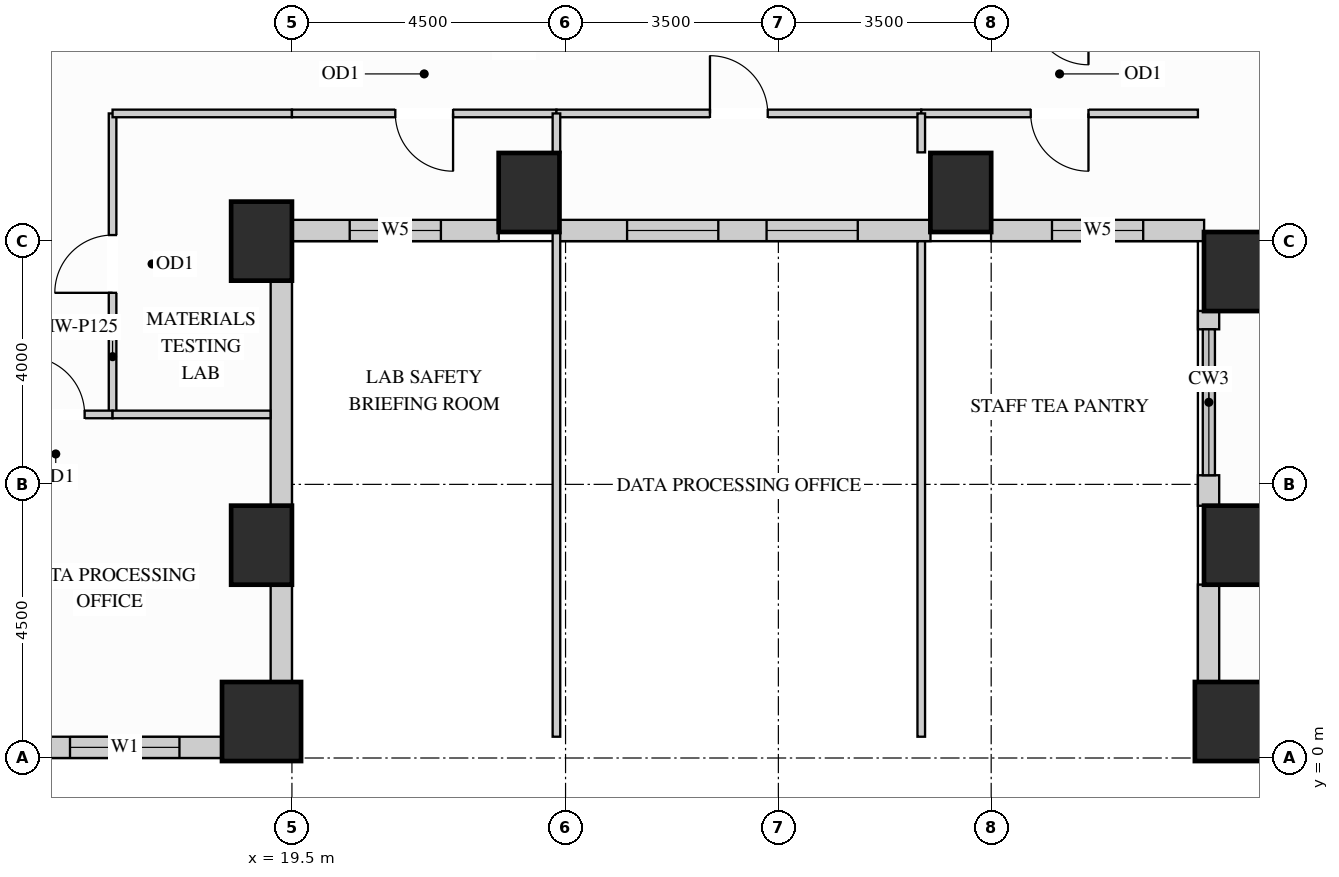
"""IFC4 building model, lengths in metres.
Left out: names, types, materials, properties, quantities, classifications, styles, units other than length and angle.
Written with IfcOpenShell. Run it as: python <this file> out.ifc"""

import sys

from ifc_helpers import new_model, si_unit, direction, frame, frame_2d, origin, origin_2d, place, context, subcontext, project, spatial, rectangle, extrude, source, transform, mapped, element, fill, save


model = new_model("IFC4")
c1 = context("Model", 3, precision=1e-05, world=origin(), true_north=direction((0.0, 1.0)))
c2 = subcontext(c1, "Body", "Model", "MODEL_VIEW")
j1 = project(units=[si_unit("LENGTHUNIT", "METRE"), si_unit("PLANEANGLEUNIT", "RADIAN")], contexts=[c1])
p1 = place(None, origin())
s1 = spatial("IfcSite", under=j1, at=p1, CompositionType="ELEMENT")
p2 = place(p1, origin())
s2 = spatial("IfcBuilding", under=s1, at=p2, CompositionType="ELEMENT")
p3 = place(p2, frame((0.0, 0.0, 58.5)))
s3 = spatial("IfcBuildingStorey", under=s2, at=p3, CompositionType="ELEMENT", Elevation=58.5)
m1 = source(origin(), c2, "Body", "SweptSolid", [
    extrude(rectangle(XDim=1.0, YDim=1.3, at=origin_2d()), origin(), (0.0, 0.0, 1.0), 3.38),
])
for number, where, z_axis, x_axis in (
    (1, (19.0, 3.5, 0.0), (0.0, 0.0, 1.0), (1.0, 0.0, 0.0)),
    (2, (19.0, 8.5, 0.0), (0.0, 0.0, 1.0), (1.0, 0.0, 0.0)),
    (3, (35.0, 3.5, 0.0), (0.0, 0.0, 1.0), (1.0, 0.0, 0.0)),
    (4, (35.0, 8.0, 0.0), (0.0, 0.0, 1.0), (1.0, 0.0, 0.0)),
    (5, (23.4, 9.3, 0.0), (0.0, 0.0, 1.0), (1.0, 0.0, 0.0)),
    (6, (30.5, 9.3, 0.0), (0.0, 0.0, 1.0), (1.0, 0.0, 0.0)),
):
    element("IfcColumn", number, at=place(p3, frame(where, z_axis=z_axis, x_axis=x_axis)), inside=s3, PredefinedType="COLUMN", context=c2, shape_type="MappedRepresentation", body=[
        mapped(m1, transform((0.0, 0.0, 0.0), x_axis=(1.0, 0.0, 0.0), y_axis=(0.0, 1.0, 0.0), z_axis=(0.0, 0.0, 1.0))),
    ])
m2 = source(origin(), c2, "Body", "SweptSolid", [
    extrude(rectangle(XDim=1.3, YDim=1.3, at=origin_2d()), origin(), (0.0, 0.0, 1.0), 3.38),
])
for number, where, z_axis, x_axis in (
    (7, (19.0, 0.6, 0.0), (0.0, 0.0, 1.0), (1.0, 0.0, 0.0)),
    (8, (35.0, 0.6, 0.0), (0.0, 0.0, 1.0), (1.0, 0.0, 0.0)),
):
    element("IfcColumn", number, at=place(p3, frame(where, z_axis=z_axis, x_axis=x_axis)), inside=s3, PredefinedType="COLUMN", context=c2, shape_type="MappedRepresentation", body=[
        mapped(m2, transform((0.0, 0.0, 0.0), x_axis=(1.0, 0.0, 0.0), y_axis=(0.0, 1.0, 0.0), z_axis=(0.0, 0.0, 1.0))),
    ])
p4 = place(p3, frame((15.148, 0.175, 0.0), z_axis=(0.0, 0.0, 1.0), x_axis=(1.0, 0.0, 0.0)))
e9 = element("IfcWall", 9, at=p4, inside=s3, PredefinedType="SOLIDWALL", context=c2, shape_type="SweptSolid", body=[
    extrude(rectangle(XDim=3.204, YDim=0.35, at=frame_2d((1.602, 0.0))), origin(), (0.0, 0.0, 1.0), 2.51),
])
p5 = place(p4, frame((0.702, 0.0, 0.78)))
e10 = element("IfcOpeningElement", 10, at=p5, cuts=e9, PredefinedType="OPENING", context=c2, shape_type="SweptSolid", body=[
    extrude(rectangle(XDim=1.8, YDim=1.55, at=frame_2d((0.9, 0.775))), frame((0.0, 0.185, 0.0), z_axis=(0.0, -1.0, 0.0), x_axis=(1.0, 0.0, 0.0)), (0.0, 0.0, 1.0), 0.37),
])
m3 = source(origin(), c2, "Body", "SweptSolid", [
    extrude(rectangle(XDim=1.604, YDim=0.35, at=frame_2d((0.802, 0.0))), origin(), (0.0, 0.0, 1.0), 2.51),
])
p6 = place(p3, frame((19.325, 1.248, 0.0), z_axis=(0.0, 0.0, 1.0), x_axis=(0.0, 1.0, 0.0)))
e11 = element("IfcWall", 11, at=p6, inside=s3, PredefinedType="SOLIDWALL", context=c2, shape_type="MappedRepresentation", body=[
    mapped(m3, transform((0.0, 0.0, 0.0), x_axis=(1.0, 0.0, 0.0), y_axis=(0.0, 1.0, 0.0), z_axis=(0.0, 0.0, 1.0))),
])
m4 = source(origin(), c2, "Body", "SweptSolid", [
    extrude(rectangle(XDim=3.704, YDim=0.35, at=frame_2d((1.852, 0.0))), origin(), (0.0, 0.0, 1.0), 2.51),
])
p7 = place(p3, frame((19.325, 4.148, 0.0), z_axis=(0.0, 0.0, 1.0), x_axis=(0.0, 1.0, 0.0)))
e12 = element("IfcWall", 12, at=p7, inside=s3, PredefinedType="SOLIDWALL", context=c2, shape_type="MappedRepresentation", body=[
    mapped(m4, transform((0.0, 0.0, 0.0), x_axis=(1.0, 0.0, 0.0), y_axis=(0.0, 1.0, 0.0), z_axis=(0.0, 0.0, 1.0))),
])
p8 = place(p3, frame((19.498, 8.675, 0.0), z_axis=(0.0, 0.0, 1.0), x_axis=(1.0, 0.0, 0.0)))
e13 = element("IfcWall", 13, at=p8, inside=s3, PredefinedType="SOLIDWALL", context=c2, shape_type="SweptSolid", body=[
    extrude(rectangle(XDim=3.404, YDim=0.35, at=frame_2d((1.702, 0.0))), origin(), (0.0, 0.0, 1.0), 3.365),
])
p9 = place(p8, frame((0.952, 0.0, 0.78)))
e14 = element("IfcOpeningElement", 14, at=p9, cuts=e13, PredefinedType="OPENING", context=c2, shape_type="SweptSolid", body=[
    extrude(rectangle(XDim=1.5, YDim=2.0, at=frame_2d((0.75, 1.0))), frame((0.0, 0.185, 0.0), z_axis=(0.0, -1.0, 0.0), x_axis=(1.0, 0.0, 0.0)), (0.0, 0.0, 1.0), 0.37),
])
p10 = place(p3, frame((23.898, 8.675, 0.0), z_axis=(0.0, 0.0, 1.0), x_axis=(1.0, 0.0, 0.0)))
e15 = element("IfcWall", 15, at=p10, inside=s3, PredefinedType="SOLIDWALL", context=c2, shape_type="SweptSolid", body=[
    extrude(rectangle(XDim=6.104, YDim=0.35, at=frame_2d((3.052, 0.0))), origin(), (0.0, 0.0, 1.0), 3.365),
])
p11 = place(p10, frame((1.114, 0.0, 0.78)))
e16 = element("IfcOpeningElement", 16, at=p11, cuts=e15, PredefinedType="OPENING", context=c2, shape_type="SweptSolid", body=[
    extrude(rectangle(XDim=1.5, YDim=2.0, at=frame_2d((0.75, 1.0))), frame((0.0, 0.185, 0.0), z_axis=(0.0, -1.0, 0.0), x_axis=(1.0, 0.0, 0.0)), (0.0, 0.0, 1.0), 0.37),
])
p12 = place(p10, frame((3.408, 0.0, 0.78)))
e17 = element("IfcOpeningElement", 17, at=p12, cuts=e15, PredefinedType="OPENING", context=c2, shape_type="SweptSolid", body=[
    extrude(rectangle(XDim=1.5, YDim=2.0, at=frame_2d((0.75, 1.0))), frame((0.0, 0.185, 0.0), z_axis=(0.0, -1.0, 0.0), x_axis=(1.0, 0.0, 0.0)), (0.0, 0.0, 1.0), 0.37),
])
p13 = place(p3, frame((30.998, 8.675, 0.0), z_axis=(0.0, 0.0, 1.0), x_axis=(1.0, 0.0, 0.0)))
e18 = element("IfcWall", 18, at=p13, inside=s3, PredefinedType="SOLIDWALL", context=c2, shape_type="SweptSolid", body=[
    extrude(rectangle(XDim=3.504, YDim=0.35, at=frame_2d((1.752, 0.0))), origin(), (0.0, 0.0, 1.0), 3.365),
])
p14 = place(p13, frame((1.002, 0.0, 0.78)))
e19 = element("IfcOpeningElement", 19, at=p14, cuts=e18, PredefinedType="OPENING", context=c2, shape_type="SweptSolid", body=[
    extrude(rectangle(XDim=1.5, YDim=2.0, at=frame_2d((0.75, 1.0))), frame((0.0, 0.185, 0.0), z_axis=(0.0, -1.0, 0.0), x_axis=(1.0, 0.0, 0.0)), (0.0, 0.0, 1.0), 0.37),
])
m5 = source(origin(), c2, "Body", "SweptSolid", [
    extrude(rectangle(XDim=0.302, YDim=0.35, at=frame_2d((0.151, 0.0))), origin(), (0.0, 0.0, 1.0), 2.51),
])
p15 = place(p3, frame((34.575, 7.352, 0.0), z_axis=(0.0, 0.0, 1.0), x_axis=(0.0, -1.0, 0.0)))
e20 = element("IfcWall", 20, at=p15, inside=s3, PredefinedType="SOLIDWALL", context=c2, shape_type="MappedRepresentation", body=[
    mapped(m5, transform((0.0, 0.0, 0.0), x_axis=(1.0, 0.0, 0.0), y_axis=(0.0, 1.0, 0.0), z_axis=(0.0, 0.0, 1.0))),
])
m6 = source(origin(), c2, "Body", "SweptSolid", [
    extrude(rectangle(XDim=0.502, YDim=0.35, at=frame_2d((0.251, 0.0))), origin(), (0.0, 0.0, 1.0), 2.51),
])
p16 = place(p3, frame((34.575, 4.65, 0.0), z_axis=(0.0, 0.0, 1.0), x_axis=(0.0, -1.0, 0.0)))
e21 = element("IfcWall", 21, at=p16, inside=s3, PredefinedType="SOLIDWALL", context=c2, shape_type="MappedRepresentation", body=[
    mapped(m6, transform((0.0, 0.0, 0.0), x_axis=(1.0, 0.0, 0.0), y_axis=(0.0, 1.0, 0.0), z_axis=(0.0, 0.0, 1.0))),
])
p17 = place(p3, frame((34.575, 2.852, 0.0), z_axis=(0.0, 0.0, 1.0), x_axis=(0.0, -1.0, 0.0)))
e22 = element("IfcWall", 22, at=p17, inside=s3, PredefinedType="SOLIDWALL", context=c2, shape_type="MappedRepresentation", body=[
    mapped(m3, transform((0.0, 0.0, 0.0), x_axis=(1.0, 0.0, 0.0), y_axis=(0.0, 1.0, 0.0), z_axis=(0.0, 0.0, 1.0))),
])
p18 = place(p3, frame((16.55, 5.65, 0.0), z_axis=(0.0, 0.0, 1.0), x_axis=(0.0, 1.0, 0.0)))
e23 = element("IfcWall", 23, at=p18, inside=s3, PredefinedType="PARTITIONING", context=c2, shape_type="SweptSolid", body=[
    extrude(rectangle(XDim=4.95, YDim=0.125, at=frame_2d((2.475, 0.0))), origin(), (0.0, 0.0, 1.0), 3.365),
])
p19 = place(p18, frame((2.0, 0.0, 0.0)))
e24 = element("IfcOpeningElement", 24, at=p19, cuts=e23, PredefinedType="OPENING", context=c2, shape_type="SweptSolid", body=[
    extrude(rectangle(XDim=0.95, YDim=2.15, at=frame_2d((0.475, 1.075))), frame((0.0, 0.073, 0.0), z_axis=(0.0, -1.0, 0.0), x_axis=(1.0, 0.0, 0.0)), (0.0, 0.0, 1.0), 0.145),
])
m7 = source(origin(), c2, "Body", "SweptSolid", [
    extrude(rectangle(XDim=2.95, YDim=0.125, at=frame_2d((1.475, 0.0))), origin(), (0.0, 0.0, 1.0), 3.365),
])
p20 = place(p3, frame((16.55, 10.6, 0.0), z_axis=(0.0, 0.0, 1.0), x_axis=(1.0, 0.0, 0.0)))
e25 = element("IfcWall", 25, at=p20, inside=s3, PredefinedType="PARTITIONING", context=c2, shape_type="MappedRepresentation", body=[
    mapped(m7, transform((0.0, 0.0, 0.0), x_axis=(1.0, 0.0, 0.0), y_axis=(0.0, 1.0, 0.0), z_axis=(0.0, 0.0, 1.0))),
])
p21 = place(p3, frame((19.5, 10.6, 0.0), z_axis=(0.0, 0.0, 1.0), x_axis=(1.0, 0.0, 0.0)))
e26 = element("IfcWall", 26, at=p21, inside=s3, PredefinedType="PARTITIONING", context=c2, shape_type="SweptSolid", body=[
    extrude(rectangle(XDim=4.35, YDim=0.125, at=frame_2d((2.175, 0.0))), origin(), (0.0, 0.0, 1.0), 3.365),
])
p22 = place(p21, frame((1.7, 0.0, 0.0)))
e27 = element("IfcOpeningElement", 27, at=p22, cuts=e26, PredefinedType="OPENING", context=c2, shape_type="SweptSolid", body=[
    extrude(rectangle(XDim=0.95, YDim=2.15, at=frame_2d((0.475, 1.075))), frame((0.0, 0.073, 0.0), z_axis=(0.0, -1.0, 0.0), x_axis=(1.0, 0.0, 0.0)), (0.0, 0.0, 1.0), 0.145),
])
p23 = place(p3, frame((23.85, 10.6, 0.0), z_axis=(0.0, 0.0, 1.0), x_axis=(1.0, 0.0, 0.0)))
e28 = element("IfcWall", 28, at=p23, inside=s3, PredefinedType="PARTITIONING", context=c2, shape_type="SweptSolid", body=[
    extrude(rectangle(XDim=6.0, YDim=0.125, at=frame_2d((3.0, 0.0))), origin(), (0.0, 0.0, 1.0), 3.365),
])
p24 = place(p23, frame((2.525, 0.0, 0.0)))
e29 = element("IfcOpeningElement", 29, at=p24, cuts=e28, PredefinedType="OPENING", context=c2, shape_type="SweptSolid", body=[
    extrude(rectangle(XDim=0.95, YDim=2.15, at=frame_2d((0.475, 1.075))), frame((0.0, 0.073, 0.0), z_axis=(0.0, -1.0, 0.0), x_axis=(1.0, 0.0, 0.0)), (0.0, 0.0, 1.0), 0.145),
])
p25 = place(p3, frame((29.85, 10.6, 0.0), z_axis=(0.0, 0.0, 1.0), x_axis=(1.0, 0.0, 0.0)))
e30 = element("IfcWall", 30, at=p25, inside=s3, PredefinedType="PARTITIONING", context=c2, shape_type="SweptSolid", body=[
    extrude(rectangle(XDim=4.55, YDim=0.125, at=frame_2d((2.275, 0.0))), origin(), (0.0, 0.0, 1.0), 3.365),
])
p26 = place(p25, frame((1.8, 0.0, 0.0)))
e31 = element("IfcOpeningElement", 31, at=p26, cuts=e30, PredefinedType="OPENING", context=c2, shape_type="SweptSolid", body=[
    extrude(rectangle(XDim=0.95, YDim=2.15, at=frame_2d((0.475, 1.075))), frame((0.0, 0.073, 0.0), z_axis=(0.0, -1.0, 0.0), x_axis=(1.0, 0.0, 0.0)), (0.0, 0.0, 1.0), 0.145),
])
m8 = source(origin(), c2, "Body", "SweptSolid", [
    extrude(rectangle(XDim=8.29, YDim=0.125, at=frame_2d((4.145, 0.0))), origin(), (0.0, 0.0, 1.0), 3.365),
])
p27 = place(p3, frame((23.85, 0.35, 0.0), z_axis=(0.0, 0.0, 1.0), x_axis=(0.0, 1.0, 0.0)))
e32 = element("IfcWall", 32, at=p27, inside=s3, PredefinedType="PARTITIONING", context=c2, shape_type="MappedRepresentation", body=[
    mapped(m8, transform((0.0, 0.0, 0.0), x_axis=(1.0, 0.0, 0.0), y_axis=(0.0, 1.0, 0.0), z_axis=(0.0, 0.0, 1.0))),
])
m9 = source(origin(), c2, "Body", "SweptSolid", [
    extrude(rectangle(XDim=0.64, YDim=0.125, at=frame_2d((0.32, 0.0))), origin(), (0.0, 0.0, 1.0), 3.365),
])
p28 = place(p3, frame((23.85, 9.96, 0.0), z_axis=(0.0, 0.0, 1.0), x_axis=(0.0, 1.0, 0.0)))
e33 = element("IfcWall", 33, at=p28, inside=s3, PredefinedType="PARTITIONING", context=c2, shape_type="MappedRepresentation", body=[
    mapped(m9, transform((0.0, 0.0, 0.0), x_axis=(1.0, 0.0, 0.0), y_axis=(0.0, 1.0, 0.0), z_axis=(0.0, 0.0, 1.0))),
])
m10 = source(origin(), c2, "Body", "SweptSolid", [
    extrude(rectangle(XDim=8.148, YDim=0.125, at=frame_2d((4.074, 0.0))), origin(), (0.0, 0.0, 1.0), 3.365),
])
p29 = place(p3, frame((29.85, 0.35, 0.0), z_axis=(0.0, 0.0, 1.0), x_axis=(0.0, 1.0, 0.0)))
e34 = element("IfcWall", 34, at=p29, inside=s3, PredefinedType="PARTITIONING", context=c2, shape_type="MappedRepresentation", body=[
    mapped(m10, transform((0.0, 0.0, 0.0), x_axis=(1.0, 0.0, 0.0), y_axis=(0.0, 1.0, 0.0), z_axis=(0.0, 0.0, 1.0))),
])
p30 = place(p3, frame((29.85, 9.96, 0.0), z_axis=(0.0, 0.0, 1.0), x_axis=(0.0, 1.0, 0.0)))
e35 = element("IfcWall", 35, at=p30, inside=s3, PredefinedType="PARTITIONING", context=c2, shape_type="MappedRepresentation", body=[
    mapped(m9, transform((0.0, 0.0, 0.0), x_axis=(1.0, 0.0, 0.0), y_axis=(0.0, 1.0, 0.0), z_axis=(0.0, 0.0, 1.0))),
])
p31 = place(p3, frame((14.681, 5.65, 0.0), z_axis=(0.0, 0.0, 1.0), x_axis=(1.0, 0.0, 0.0)))
e36 = element("IfcWall", 36, at=p31, inside=s3, PredefinedType="PARTITIONING", context=c2, shape_type="SweptSolid", body=[
    extrude(rectangle(XDim=1.869, YDim=0.125, at=frame_2d((0.935, 0.0))), origin(), (0.0, 0.0, 1.0), 3.365),
])
p32 = place(p31, frame((0.459, 0.0, 0.0)))
e37 = element("IfcOpeningElement", 37, at=p32, cuts=e36, PredefinedType="OPENING", context=c2, shape_type="SweptSolid", body=[
    extrude(rectangle(XDim=0.95, YDim=2.15, at=frame_2d((0.475, 1.075))), frame((0.0, 0.073, 0.0), z_axis=(0.0, -1.0, 0.0), x_axis=(1.0, 0.0, 0.0)), (0.0, 0.0, 1.0), 0.145),
])
m11 = source(origin(), c2, "Body", "SweptSolid", [
    extrude(rectangle(XDim=2.598, YDim=0.125, at=frame_2d((1.299, 0.0))), origin(), (0.0, 0.0, 1.0), 3.365),
])
p33 = place(p3, frame((16.55, 5.65, 0.0), z_axis=(0.0, 0.0, 1.0), x_axis=(1.0, 0.0, 0.0)))
e38 = element("IfcWall", 38, at=p33, inside=s3, PredefinedType="PARTITIONING", context=c2, shape_type="MappedRepresentation", body=[
    mapped(m11, transform((0.0, 0.0, 0.0), x_axis=(1.0, 0.0, 0.0), y_axis=(0.0, 1.0, 0.0), z_axis=(0.0, 0.0, 1.0))),
])
m12 = source(origin(), c2, "Body", "SweptSolid", [
    extrude(rectangle(XDim=0.95, YDim=2.15, at=frame_2d((0.475, 1.075))), frame((0.0, 0.025, 0.0), z_axis=(0.0, -1.0, 0.0), x_axis=(1.0, 0.0, 0.0)), (0.0, 0.0, 1.0), 0.05),
])
p34 = place(p19, origin())
e39 = element("IfcDoor", 39, at=p34, inside=s3, OperationType="SINGLE_SWING_LEFT", PredefinedType="DOOR", context=c2, shape_type="MappedRepresentation", body=[
    mapped(m12, transform((0.0, 0.0, 0.0), x_axis=(1.0, 0.0, 0.0), y_axis=(0.0, 1.0, 0.0), z_axis=(0.0, 0.0, 1.0))),
])
fill(e24, e39)
p35 = place(p32, origin())
e40 = element("IfcDoor", 40, at=p35, inside=s3, OperationType="SINGLE_SWING_LEFT", PredefinedType="DOOR", context=c2, shape_type="MappedRepresentation", body=[
    mapped(m12, transform((0.0, 0.0, 0.0), x_axis=(1.0, 0.0, 0.0), y_axis=(0.0, 1.0, 0.0), z_axis=(0.0, 0.0, 1.0))),
])
fill(e37, e40)
p36 = place(p22, origin())
e41 = element("IfcDoor", 41, at=p36, inside=s3, OperationType="SINGLE_SWING_RIGHT", PredefinedType="DOOR", context=c2, shape_type="MappedRepresentation", body=[
    mapped(m12, transform((0.0, 0.0, 0.0), x_axis=(1.0, 0.0, 0.0), y_axis=(0.0, 1.0, 0.0), z_axis=(0.0, 0.0, 1.0))),
])
fill(e27, e41)
p37 = place(p24, origin())
e42 = element("IfcDoor", 42, at=p37, inside=s3, OperationType="SINGLE_SWING_LEFT", PredefinedType="DOOR", context=c2, shape_type="MappedRepresentation", body=[
    mapped(m12, transform((0.0, 0.0, 0.0), x_axis=(1.0, 0.0, 0.0), y_axis=(0.0, 1.0, 0.0), z_axis=(0.0, 0.0, 1.0))),
])
fill(e29, e42)
p38 = place(p26, origin())
e43 = element("IfcDoor", 43, at=p38, inside=s3, OperationType="SINGLE_SWING_RIGHT", PredefinedType="DOOR", context=c2, shape_type="MappedRepresentation", body=[
    mapped(m12, transform((0.0, 0.0, 0.0), x_axis=(1.0, 0.0, 0.0), y_axis=(0.0, 1.0, 0.0), z_axis=(0.0, 0.0, 1.0))),
])
fill(e31, e43)
m13 = source(origin(), c2, "Body", "SweptSolid", [
    extrude(rectangle(XDim=1.8, YDim=1.55, at=frame_2d((0.9, 0.775))), frame((0.0, 0.03, 0.0), z_axis=(0.0, -1.0, 0.0), x_axis=(1.0, 0.0, 0.0)), (0.0, 0.0, 1.0), 0.06),
])
p39 = place(p5, origin())
e44 = element("IfcWindow", 44, at=p39, inside=s3, PartitioningType="SINGLE_PANEL", PredefinedType="WINDOW", context=c2, shape_type="MappedRepresentation", body=[
    mapped(m13, transform((0.0, 0.0, 0.0), x_axis=(1.0, 0.0, 0.0), y_axis=(0.0, 1.0, 0.0), z_axis=(0.0, 0.0, 1.0))),
])
fill(e10, e44)
m14 = source(origin(), c2, "Body", "SweptSolid", [
    extrude(rectangle(XDim=1.5, YDim=2.0, at=frame_2d((0.75, 1.0))), frame((0.0, 0.03, 0.0), z_axis=(0.0, -1.0, 0.0), x_axis=(1.0, 0.0, 0.0)), (0.0, 0.0, 1.0), 0.06),
])
p40 = place(p9, origin())
e45 = element("IfcWindow", 45, at=p40, inside=s3, PartitioningType="SINGLE_PANEL", PredefinedType="WINDOW", context=c2, shape_type="MappedRepresentation", body=[
    mapped(m14, transform((0.0, 0.0, 0.0), x_axis=(1.0, 0.0, 0.0), y_axis=(0.0, 1.0, 0.0), z_axis=(0.0, 0.0, 1.0))),
])
fill(e14, e45)
p41 = place(p11, origin())
e46 = element("IfcWindow", 46, at=p41, inside=s3, PartitioningType="SINGLE_PANEL", PredefinedType="WINDOW", context=c2, shape_type="MappedRepresentation", body=[
    mapped(m14, transform((0.0, 0.0, 0.0), x_axis=(1.0, 0.0, 0.0), y_axis=(0.0, 1.0, 0.0), z_axis=(0.0, 0.0, 1.0))),
])
fill(e16, e46)
p42 = place(p12, origin())
e47 = element("IfcWindow", 47, at=p42, inside=s3, PartitioningType="SINGLE_PANEL", PredefinedType="WINDOW", context=c2, shape_type="MappedRepresentation", body=[
    mapped(m14, transform((0.0, 0.0, 0.0), x_axis=(1.0, 0.0, 0.0), y_axis=(0.0, 1.0, 0.0), z_axis=(0.0, 0.0, 1.0))),
])
fill(e17, e47)
p43 = place(p14, origin())
e48 = element("IfcWindow", 48, at=p43, inside=s3, PartitioningType="SINGLE_PANEL", PredefinedType="WINDOW", context=c2, shape_type="MappedRepresentation", body=[
    mapped(m14, transform((0.0, 0.0, 0.0), x_axis=(1.0, 0.0, 0.0), y_axis=(0.0, 1.0, 0.0), z_axis=(0.0, 0.0, 1.0))),
])
fill(e19, e48)
save(model, sys.argv[1])
